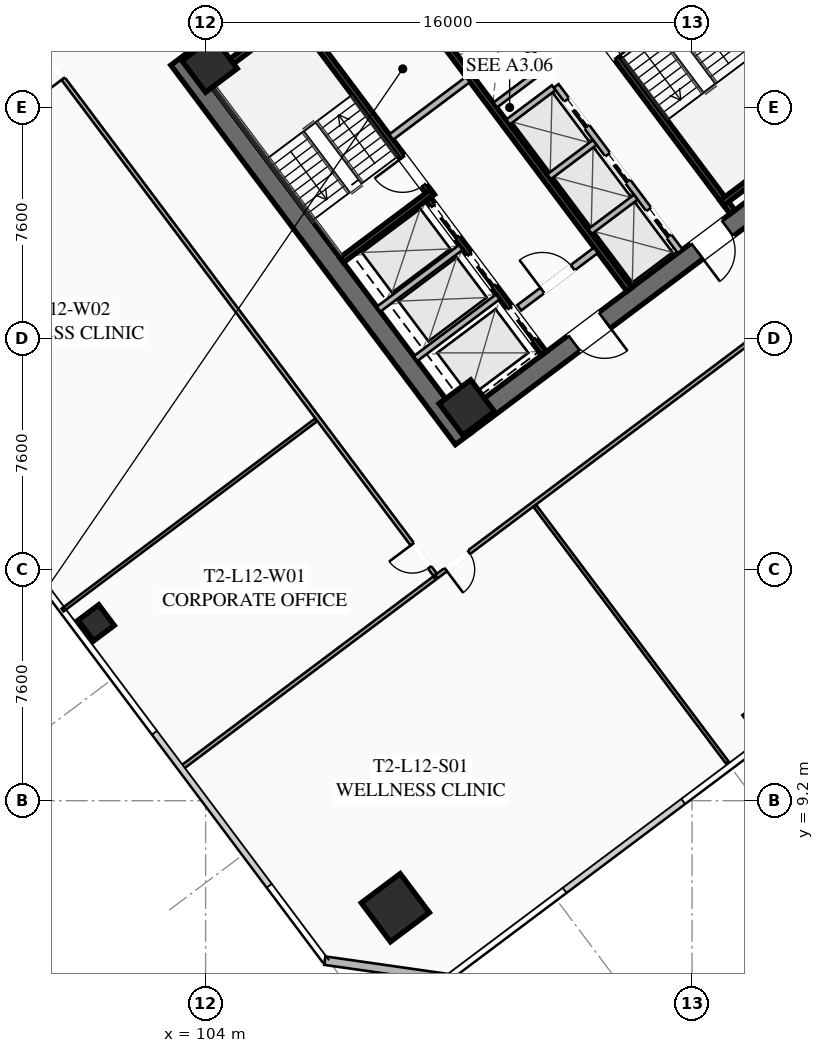
"""IFC4 building model, lengths in metres.
Left out: names, types, materials, properties, quantities, classifications, styles, units other than length and angle.
Written with IfcOpenShell. Run it as: python <this file> out.ifc"""

import sys

from ifc_helpers import new_model, si_unit, direction, frame, frame_2d, origin, origin_2d, place, context, subcontext, project, spatial, rectangle, hollow_rectangle, extrude, element, fill, save


model = new_model("IFC4")
c1 = context("Model", 3, precision=1e-05, world=origin(), true_north=direction((0.0, 1.0)))
c2 = subcontext(c1, "Body", "Model", "MODEL_VIEW")
j1 = project(units=[si_unit("LENGTHUNIT", "METRE"), si_unit("PLANEANGLEUNIT", "RADIAN")], contexts=[c1])
p1 = place(None, origin())
s1 = spatial("IfcSite", under=j1, at=p1, CompositionType="ELEMENT")
p2 = place(p1, origin())
s2 = spatial("IfcBuilding", under=s1, at=p2, CompositionType="ELEMENT")
p3 = place(p2, frame((0.0, 0.0, 49.45)))
s3 = spatial("IfcBuildingStorey", under=s2, at=p3, CompositionType="ELEMENT", Elevation=49.45)
for number, where, z_axis, x_axis in (
    (1, (112.476, 21.107, 0.0), (0.0, 0.0, 1.0), (-0.6, 0.8, 0.0)),
    (2, (115.524, 42.893, 0.0), (0.0, 0.0, 1.0), (0.6, -0.8, 0.0)),
):
    element("IfcWall", number, at=place(p3, frame(where, z_axis=z_axis, x_axis=x_axis)), inside=s3, PredefinedType="SHEAR", context=c2, shape_type="SweptSolid", body=[
        extrude(rectangle(XDim=15.6, YDim=0.65, at=frame_2d((7.8, 0.0))), origin(), (0.0, 0.0, 1.0), 3.55),
    ])
p4 = place(p3, frame((124.429, 30.478, 0.0), z_axis=(0.0, 0.0, 1.0), x_axis=(-0.799998028465, -0.600002628705, 0.0)))
e3 = element("IfcWall", 3, at=p4, inside=s3, PredefinedType="SHEAR", context=c2, shape_type="SweptSolid", body=[
    extrude(rectangle(XDim=14.86, YDim=0.65, at=frame_2d((7.43, 0.0))), origin(), (0.0, 0.0, 1.0), 3.55),
])
p5 = place(p4, frame((9.13, 0.0, 0.0)))
e4 = element("IfcOpeningElement", 4, at=p5, cuts=e3, PredefinedType="OPENING", context=c2, shape_type="SweptSolid", body=[
    extrude(rectangle(XDim=1.25, YDim=2.25, at=frame_2d((0.625, 1.125))), frame((0.0, 0.335, 0.0), z_axis=(0.0, -1.0, 0.0), x_axis=(1.0, 0.0, 0.0)), (0.0, 0.0, 1.0), 0.67),
])
p6 = place(p4, frame((4.08, 0.0, 0.0)))
e5 = element("IfcOpeningElement", 5, at=p6, cuts=e3, PredefinedType="OPENING", context=c2, shape_type="SweptSolid", body=[
    extrude(rectangle(XDim=1.25, YDim=2.25, at=frame_2d((0.625, 1.125))), frame((0.0, 0.335, 0.0), z_axis=(0.0, -1.0, 0.0), x_axis=(1.0, 0.0, 0.0)), (0.0, 0.0, 1.0), 0.67),
])
p7 = place(p3, frame((103.571, 33.522, 0.0), z_axis=(0.0, 0.0, 1.0), x_axis=(0.799998028465, 0.600002628705, 0.0)))
e6 = element("IfcWall", 6, at=p7, inside=s3, PredefinedType="SHEAR", context=c2, shape_type="SweptSolid", body=[
    extrude(rectangle(XDim=14.86, YDim=0.65, at=frame_2d((7.43, 0.0))), origin(), (0.0, 0.0, 1.0), 3.55),
])
p8 = place(p7, frame((4.48, 0.0, 0.0)))
e7 = element("IfcOpeningElement", 7, at=p8, cuts=e6, PredefinedType="OPENING", context=c2, shape_type="SweptSolid", body=[
    extrude(rectangle(XDim=1.25, YDim=2.25, at=frame_2d((0.625, 1.125))), frame((0.0, 0.335, 0.0), z_axis=(0.0, -1.0, 0.0), x_axis=(1.0, 0.0, 0.0)), (0.0, 0.0, 1.0), 0.67),
])
p9 = place(p7, frame((9.53, 0.0, 0.0)))
e8 = element("IfcOpeningElement", 8, at=p9, cuts=e6, PredefinedType="OPENING", context=c2, shape_type="SweptSolid", body=[
    extrude(rectangle(XDim=1.25, YDim=2.25, at=frame_2d((0.625, 1.125))), frame((0.0, 0.335, 0.0), z_axis=(0.0, -1.0, 0.0), x_axis=(1.0, 0.0, 0.0)), (0.0, 0.0, 1.0), 0.67),
])
for number, where, z_axis, x_axis in (
    (9, (112.59, 22.13, 0.0), (0.0, 0.0, 1.0), (0.8, 0.6, 0.0)),
    (10, (104.13, 33.41, 0.0), (0.0, 0.0, 1.0), (0.8, 0.6, 0.0)),
):
    element("IfcColumn", number, at=place(p3, frame(where, z_axis=z_axis, x_axis=x_axis)), inside=s3, PredefinedType="COLUMN", context=c2, shape_type="SweptSolid", body=[
        extrude(hollow_rectangle(XDim=1.3, YDim=1.3, WallThickness=0.05, at=origin_2d()), origin(), (0.0, 0.0, 1.0), 3.35),
    ])
p10 = place(p3, frame((110.24, 5.68, 0.0), z_axis=(0.0, 0.0, 1.0), x_axis=(0.799999996291, 0.600000004945, 0.0)))
e11 = element("IfcColumn", 11, at=p10, inside=s3, PredefinedType="COLUMN", context=c2, shape_type="SweptSolid", body=[
    extrude(hollow_rectangle(XDim=1.6, YDim=1.6, WallThickness=0.06, at=origin_2d()), origin(), (0.0, 0.0, 1.0), 3.35),
])
for number, where, z_axis, x_axis in (
    (12, (122.31, 11.92, 0.0), (0.0, 0.0, 1.0), (0.8, 0.6, 0.0)),
    (13, (100.4, 15.05, 0.0), (0.0, 0.0, 1.0), (0.8, 0.6, 0.0)),
):
    element("IfcColumn", number, at=place(p3, frame(where, z_axis=z_axis, x_axis=x_axis)), inside=s3, PredefinedType="COLUMN", context=c2, shape_type="SweptSolid", body=[
        extrude(hollow_rectangle(XDim=0.85, YDim=0.85, WallThickness=0.035, at=origin_2d()), origin(), (0.0, 0.0, 1.0), 3.35),
    ])
p11 = place(p3, frame((111.98, 3.36, 0.0), z_axis=(0.0, 0.0, 1.0), x_axis=(-0.989955445613, 0.14137968631, 0.0)))
e14 = element("IfcWall", 14, at=p11, inside=s3, PredefinedType="SOLIDWALL", context=c2, shape_type="SweptSolid", body=[
    extrude(rectangle(XDim=4.101, YDim=0.28, at=frame_2d((2.051, 0.0))), origin(), (0.0, 0.0, 1.0), 3.35),
])
p12 = place(p3, frame((111.44, 29.08, 0.0), z_axis=(0.0, 0.0, 1.0), x_axis=(-0.600009827119, 0.799992629566, 0.0)))
e15 = element("IfcWall", 15, at=p12, inside=s3, PredefinedType="SHEAR", context=c2, shape_type="SweptSolid", body=[
    extrude(rectangle(XDim=7.95, YDim=0.2, at=frame_2d((3.975, 0.0))), origin(), (0.0, 0.0, 1.0), 3.35),
])
p13 = place(p12, frame((0.45, 0.0, 0.0)))
e16 = element("IfcOpeningElement", 16, at=p13, cuts=e15, PredefinedType="OPENING", context=c2, shape_type="SweptSolid", body=[
    extrude(rectangle(XDim=1.15, YDim=2.2, at=frame_2d((0.575, 1.1))), frame((0.0, 0.11, 0.0), z_axis=(0.0, -1.0, 0.0), x_axis=(1.0, 0.0, 0.0)), (0.0, 0.0, 1.0), 0.22),
])
for number, where, z_axis, x_axis in (
    (17, (108.476, 26.982, 0.0), (0.0, 0.0, 1.0), (0.8, 0.6, 0.0)),
    (18, (104.036, 32.902, 0.0), (0.0, 0.0, 1.0), (0.8, 0.6, 0.0)),
):
    element("IfcWall", number, at=place(p3, frame(where, z_axis=z_axis, x_axis=x_axis)), inside=s3, PredefinedType="SHEAR", context=c2, shape_type="SweptSolid", body=[
        extrude(rectangle(XDim=3.73, YDim=0.2, at=frame_2d((1.865, 0.0))), origin(), (0.0, 0.0, 1.0), 3.35),
    ])
p14 = place(p3, frame((116.56, 34.92, 0.0), z_axis=(0.0, 0.0, 1.0), x_axis=(0.600009827119, -0.799992629566, 0.0)))
e19 = element("IfcWall", 19, at=p14, inside=s3, PredefinedType="SHEAR", context=c2, shape_type="SweptSolid", body=[
    extrude(rectangle(XDim=7.95, YDim=0.2, at=frame_2d((3.975, 0.0))), origin(), (0.0, 0.0, 1.0), 3.35),
])
p15 = place(p14, frame((0.45, 0.0, 0.0)))
e20 = element("IfcOpeningElement", 20, at=p15, cuts=e19, PredefinedType="OPENING", context=c2, shape_type="SweptSolid", body=[
    extrude(rectangle(XDim=1.15, YDim=2.2, at=frame_2d((0.575, 1.1))), frame((0.0, 0.11, 0.0), z_axis=(0.0, -1.0, 0.0), x_axis=(1.0, 0.0, 0.0)), (0.0, 0.0, 1.0), 0.22),
])
p16 = place(p3, frame((120.98, 28.86, 0.0), z_axis=(0.0, 0.0, 1.0), x_axis=(0.800039270442, 0.59994763584, 0.0)))
e21 = element("IfcWall", 21, at=p16, inside=s3, PredefinedType="SHEAR", context=c2, shape_type="SweptSolid", body=[
    extrude(rectangle(XDim=3.73, YDim=0.2, at=frame_2d((1.865, 0.0))), origin(), (0.0, 0.0, 1.0), 3.35),
])
p17 = place(p3, frame((117.938, 26.016, 0.0), z_axis=(0.0, 0.0, 1.0), x_axis=(-0.600005463273, 0.799995902516, 0.0)))
e22 = element("IfcWall", 22, at=p17, inside=s3, PredefinedType="SHEAR", context=c2, shape_type="SweptSolid", body=[
    extrude(rectangle(XDim=14.3, YDim=0.2, at=frame_2d((7.15, 0.0))), origin(), (0.0, 0.0, 1.0), 3.35),
])
p18 = place(p3, frame((110.104, 31.028, 0.0), z_axis=(0.0, 0.0, 1.0), x_axis=(0.800018601094, 0.59997519774, 0.0)))
e23 = element("IfcWall", 23, at=p18, inside=s3, PredefinedType="SOLIDWALL", context=c2, shape_type="SweptSolid", body=[
    extrude(rectangle(XDim=3.15, YDim=0.22, at=frame_2d((1.575, 0.0))), origin(), (0.0, 0.0, 1.0), 2.703),
])
p19 = place(p3, frame((114.316, 25.412, 0.0), z_axis=(0.0, 0.0, 1.0), x_axis=(0.800018601094, 0.59997519774, 0.0)))
e24 = element("IfcWall", 24, at=p19, inside=s3, PredefinedType="SOLIDWALL", context=c2, shape_type="SweptSolid", body=[
    extrude(rectangle(XDim=3.15, YDim=0.22, at=frame_2d((1.575, 0.0))), origin(), (0.0, 0.0, 1.0), 2.703),
])
p20 = place(p19, frame((0.95, 0.0, 0.0)))
e25 = element("IfcOpeningElement", 25, at=p20, cuts=e24, PredefinedType="OPENING", context=c2, shape_type="SweptSolid", body=[
    extrude(rectangle(XDim=1.25, YDim=2.25, at=frame_2d((0.625, 1.125))), frame((0.0, 0.12, 0.0), z_axis=(0.0, -1.0, 0.0), x_axis=(1.0, 0.0, 0.0)), (0.0, 0.0, 1.0), 0.24),
])
p21 = place(p3, frame((115.13, 23.91, 0.0), z_axis=(0.0, 0.0, 1.0), x_axis=(-0.599975393228, 0.800018454488, 0.0)))
e26 = element("IfcWall", 26, at=p21, inside=s3, PredefinedType="SHEAR", context=c2, shape_type="SweptSolid", body=[
    extrude(rectangle(XDim=6.35, YDim=0.2, at=frame_2d((3.175, 0.0))), origin(), (0.0, 0.0, 1.0), 3.35),
])
p22 = place(p21, frame((4.775, 0.0, 0.0)))
e27 = element("IfcOpeningElement", 27, at=p22, cuts=e26, PredefinedType="OPENING", context=c2, shape_type="SweptSolid", body=[
    extrude(rectangle(XDim=1.3, YDim=2.25, at=frame_2d((0.65, 1.125))), frame((0.0, 0.11, 0.0), z_axis=(0.0, -1.0, 0.0), x_axis=(1.0, 0.0, 0.0)), (0.0, 0.0, 1.0), 0.22),
])
p23 = place(p21, frame((2.775, 0.0, 0.0)))
e28 = element("IfcOpeningElement", 28, at=p23, cuts=e26, PredefinedType="OPENING", context=c2, shape_type="SweptSolid", body=[
    extrude(rectangle(XDim=1.3, YDim=2.25, at=frame_2d((0.65, 1.125))), frame((0.0, 0.11, 0.0), z_axis=(0.0, -1.0, 0.0), x_axis=(1.0, 0.0, 0.0)), (0.0, 0.0, 1.0), 0.22),
])
p24 = place(p21, frame((0.575, 0.0, 0.0)))
e29 = element("IfcOpeningElement", 29, at=p24, cuts=e26, PredefinedType="OPENING", context=c2, shape_type="SweptSolid", body=[
    extrude(rectangle(XDim=1.3, YDim=2.25, at=frame_2d((0.65, 1.125))), frame((0.0, 0.11, 0.0), z_axis=(0.0, -1.0, 0.0), x_axis=(1.0, 0.0, 0.0)), (0.0, 0.0, 1.0), 0.22),
])
for number, where, z_axis, x_axis in (
    (30, (110.906, 23.742, 0.0), (0.0, 0.0, 1.0), (0.8, 0.6, 0.0)),
    (31, (109.688, 25.366, 0.0), (0.0, 0.0, 1.0), (0.8, 0.6, 0.0)),
):
    element("IfcWall", number, at=place(p3, frame(where, z_axis=z_axis, x_axis=x_axis)), inside=s3, PredefinedType="SOLIDWALL", context=c2, shape_type="SweptSolid", body=[
        extrude(rectangle(XDim=3.38, YDim=0.2, at=frame_2d((1.69, 0.0))), origin(), (0.0, 0.0, 1.0), 3.35),
    ])
p25 = place(p3, frame((119.61, 27.27, 0.0), z_axis=(0.0, 0.0, 1.0), x_axis=(-0.600011488909, 0.79999138319, 0.0)))
e32 = element("IfcWall", 32, at=p25, inside=s3, PredefinedType="SOLIDWALL", context=c2, shape_type="SweptSolid", body=[
    extrude(rectangle(XDim=6.8, YDim=0.2, at=frame_2d((3.4, 0.0))), origin(), (0.0, 0.0, 1.0), 3.35),
])
p26 = place(p25, frame((0.625, 0.0, 0.0)))
e33 = element("IfcOpeningElement", 33, at=p26, cuts=e32, PredefinedType="OPENING", context=c2, shape_type="SweptSolid", body=[
    extrude(rectangle(XDim=1.1, YDim=2.2, at=frame_2d((0.55, 1.1))), frame((0.0, 0.11, 0.0), z_axis=(0.0, -1.0, 0.0), x_axis=(1.0, 0.0, 0.0)), (0.0, 0.0, 1.0), 0.22),
])
p27 = place(p25, frame((2.875, 0.0, 0.0)))
e34 = element("IfcOpeningElement", 34, at=p27, cuts=e32, PredefinedType="OPENING", context=c2, shape_type="SweptSolid", body=[
    extrude(rectangle(XDim=1.1, YDim=2.2, at=frame_2d((0.55, 1.1))), frame((0.0, 0.11, 0.0), z_axis=(0.0, -1.0, 0.0), x_axis=(1.0, 0.0, 0.0)), (0.0, 0.0, 1.0), 0.22),
])
p28 = place(p25, frame((5.125, 0.0, 0.0)))
e35 = element("IfcOpeningElement", 35, at=p28, cuts=e32, PredefinedType="OPENING", context=c2, shape_type="SweptSolid", body=[
    extrude(rectangle(XDim=1.1, YDim=2.2, at=frame_2d((0.55, 1.1))), frame((0.0, 0.11, 0.0), z_axis=(0.0, -1.0, 0.0), x_axis=(1.0, 0.0, 0.0)), (0.0, 0.0, 1.0), 0.22),
])
p29 = place(p3, frame((116.646, 27.922, 0.0), z_axis=(0.0, 0.0, 1.0), x_axis=(0.8, 0.6, 0.0)))
e36 = element("IfcWall", 36, at=p29, inside=s3, PredefinedType="SOLIDWALL", context=c2, shape_type="SweptSolid", body=[
    extrude(rectangle(XDim=1.88, YDim=0.2, at=frame_2d((0.94, 0.0))), origin(), (0.0, 0.0, 1.0), 3.35),
])
p30 = place(p3, frame((115.296, 29.722, 0.0), z_axis=(0.0, 0.0, 1.0), x_axis=(0.799984418148, 0.600020775241, 0.0)))
e37 = element("IfcWall", 37, at=p30, inside=s3, PredefinedType="SOLIDWALL", context=c2, shape_type="SweptSolid", body=[
    extrude(rectangle(XDim=1.88, YDim=0.2, at=frame_2d((0.94, 0.0))), origin(), (0.0, 0.0, 1.0), 3.35),
])
p31 = place(p3, frame((113.946, 31.522, 0.0), z_axis=(0.0, 0.0, 1.0), x_axis=(0.8, 0.6, 0.0)))
e38 = element("IfcWall", 38, at=p31, inside=s3, PredefinedType="SOLIDWALL", context=c2, shape_type="SweptSolid", body=[
    extrude(rectangle(XDim=1.88, YDim=0.2, at=frame_2d((0.94, 0.0))), origin(), (0.0, 0.0, 1.0), 3.35),
])
p32 = place(p3, frame((115.11, 33.27, 0.0), z_axis=(0.0, 0.0, 1.0), x_axis=(-0.600011488909, 0.79999138319, 0.0)))
e39 = element("IfcWall", 39, at=p32, inside=s3, PredefinedType="SOLIDWALL", context=c2, shape_type="SweptSolid", body=[
    extrude(rectangle(XDim=6.8, YDim=0.2, at=frame_2d((3.4, 0.0))), origin(), (0.0, 0.0, 1.0), 3.35),
])
p33 = place(p3, frame((113.526, 32.082, 0.0), z_axis=(0.0, 0.0, 1.0), x_axis=(0.800046745961, 0.599937666993, 0.0)))
e40 = element("IfcWall", 40, at=p33, inside=s3, PredefinedType="SOLIDWALL", context=c2, shape_type="SweptSolid", body=[
    extrude(rectangle(XDim=1.88, YDim=0.2, at=frame_2d((0.94, 0.0))), origin(), (0.0, 0.0, 1.0), 3.35),
])
p34 = place(p3, frame((112.176, 33.882, 0.0), z_axis=(0.0, 0.0, 1.0), x_axis=(0.8, 0.6, 0.0)))
e41 = element("IfcWall", 41, at=p34, inside=s3, PredefinedType="SOLIDWALL", context=c2, shape_type="SweptSolid", body=[
    extrude(rectangle(XDim=1.88, YDim=0.2, at=frame_2d((0.94, 0.0))), origin(), (0.0, 0.0, 1.0), 3.35),
])
p35 = place(p3, frame((135.46, 34.47, 0.0), z_axis=(0.0, 0.0, 1.0), x_axis=(-0.800000982127, -0.599998690494, 0.0)))
e42 = element("IfcWall", 42, at=p35, inside=s3, PredefinedType="PARTITIONING", context=c2, shape_type="SweptSolid", body=[
    extrude(rectangle(XDim=29.83, YDim=0.135, at=frame_2d((14.915, 0.0))), origin(), (0.0, 0.0, 1.0), 2.703),
])
p36 = place(p35, frame((28.5, 0.0, 0.0)))
e43 = element("IfcOpeningElement", 43, at=p36, cuts=e42, PredefinedType="OPENING", context=c2, shape_type="SweptSolid", body=[
    extrude(rectangle(XDim=0.95, YDim=2.05, at=frame_2d((0.475, 1.025))), frame((0.0, 0.077, 0.0), z_axis=(0.0, -1.0, 0.0), x_axis=(1.0, 0.0, 0.0)), (0.0, 0.0, 1.0), 0.155),
])
p37 = place(p35, frame((0.38, 0.0, 0.0)))
e44 = element("IfcOpeningElement", 44, at=p37, cuts=e42, PredefinedType="OPENING", context=c2, shape_type="SweptSolid", body=[
    extrude(rectangle(XDim=0.95, YDim=2.05, at=frame_2d((0.475, 1.025))), frame((0.0, 0.077, 0.0), z_axis=(0.0, -1.0, 0.0), x_axis=(1.0, 0.0, 0.0)), (0.0, 0.0, 1.0), 0.155),
])
p38 = place(p3, frame((121.158, 10.456, 0.0), z_axis=(0.0, 0.0, 1.0), x_axis=(-0.600007405188, 0.799994446056, 0.0)))
e45 = element("IfcWall", 45, at=p38, inside=s3, PredefinedType="PARTITIONING", context=c2, shape_type="SweptSolid", body=[
    extrude(rectangle(XDim=10.55, YDim=0.11, at=frame_2d((5.275, 0.0))), origin(), (0.0, 0.0, 1.0), 2.703),
])
p39 = place(p3, frame((111.548, 16.636, 0.0), z_axis=(0.0, 0.0, 1.0), x_axis=(-0.600003610192, 0.799997292343, 0.0)))
e46 = element("IfcWall", 46, at=p39, inside=s3, PredefinedType="PARTITIONING", context=c2, shape_type="SweptSolid", body=[
    extrude(rectangle(XDim=21.64, YDim=0.135, at=frame_2d((10.82, 0.0))), origin(), (0.0, 0.0, 1.0), 2.703),
])
p40 = place(p39, frame((0.3, 0.0, 0.0)))
e47 = element("IfcOpeningElement", 47, at=p40, cuts=e46, PredefinedType="OPENING", context=c2, shape_type="SweptSolid", body=[
    extrude(rectangle(XDim=0.95, YDim=2.05, at=frame_2d((0.475, 1.025))), frame((0.0, 0.077, 0.0), z_axis=(0.0, -1.0, 0.0), x_axis=(1.0, 0.0, 0.0)), (0.0, 0.0, 1.0), 0.155),
])
p41 = place(p39, frame((20.39, 0.0, 0.0)))
e48 = element("IfcOpeningElement", 48, at=p41, cuts=e46, PredefinedType="OPENING", context=c2, shape_type="SweptSolid", body=[
    extrude(rectangle(XDim=0.95, YDim=2.05, at=frame_2d((0.475, 1.025))), frame((0.0, 0.077, 0.0), z_axis=(0.0, -1.0, 0.0), x_axis=(1.0, 0.0, 0.0)), (0.0, 0.0, 1.0), 0.155),
])
p42 = place(p3, frame((103.196, 10.272, 0.0), z_axis=(0.0, 0.0, 1.0), x_axis=(0.8, 0.6, 0.0)))
e49 = element("IfcWall", 49, at=p42, inside=s3, PredefinedType="PARTITIONING", context=c2, shape_type="SweptSolid", body=[
    extrude(rectangle(XDim=10.42, YDim=0.135, at=frame_2d((5.21, 0.0))), origin(), (0.0, 0.0, 1.0), 2.703),
])
p43 = place(p3, frame((99.296, 15.472, 0.0), z_axis=(0.0, 0.0, 1.0), x_axis=(0.799997188462, 0.600003748699, 0.0)))
e50 = element("IfcWall", 50, at=p43, inside=s3, PredefinedType="PARTITIONING", context=c2, shape_type="SweptSolid", body=[
    extrude(rectangle(XDim=10.42, YDim=0.11, at=frame_2d((5.21, 0.0))), origin(), (0.0, 0.0, 1.0), 2.703),
])
p44 = place(p5, origin())
e51 = element("IfcDoor", 51, at=p44, inside=s3, OperationType="SINGLE_SWING_LEFT", PredefinedType="DOOR", context=c2, shape_type="SweptSolid", body=[
    extrude(rectangle(XDim=1.25, YDim=2.25, at=frame_2d((0.625, 1.125))), frame((0.0, 0.025, 0.0), z_axis=(0.0, -1.0, 0.0), x_axis=(1.0, 0.0, 0.0)), (0.0, 0.0, 1.0), 0.05),
])
fill(e4, e51)
p45 = place(p6, origin())
e52 = element("IfcDoor", 52, at=p45, inside=s3, OperationType="SINGLE_SWING_RIGHT", PredefinedType="DOOR", context=c2, shape_type="SweptSolid", body=[
    extrude(rectangle(XDim=1.25, YDim=2.25, at=frame_2d((0.625, 1.125))), frame((0.0, 0.025, 0.0), z_axis=(0.0, -1.0, 0.0), x_axis=(1.0, 0.0, 0.0)), (0.0, 0.0, 1.0), 0.05),
])
fill(e5, e52)
p46 = place(p13, origin())
e53 = element("IfcDoor", 53, at=p46, inside=s3, OperationType="SINGLE_SWING_RIGHT", PredefinedType="DOOR", context=c2, shape_type="SweptSolid", body=[
    extrude(rectangle(XDim=1.15, YDim=2.2, at=frame_2d((0.575, 1.1))), frame((0.0, 0.025, 0.0), z_axis=(0.0, -1.0, 0.0), x_axis=(1.0, 0.0, 0.0)), (0.0, 0.0, 1.0), 0.05),
])
fill(e16, e53)
p47 = place(p15, origin())
e54 = element("IfcDoor", 54, at=p47, inside=s3, OperationType="SINGLE_SWING_RIGHT", PredefinedType="DOOR", context=c2, shape_type="SweptSolid", body=[
    extrude(rectangle(XDim=1.15, YDim=2.2, at=frame_2d((0.575, 1.1))), frame((0.0, 0.025, 0.0), z_axis=(0.0, -1.0, 0.0), x_axis=(1.0, 0.0, 0.0)), (0.0, 0.0, 1.0), 0.05),
])
fill(e20, e54)
p48 = place(p20, origin())
e55 = element("IfcDoor", 55, at=p48, inside=s3, OperationType="SINGLE_SWING_LEFT", PredefinedType="DOOR", context=c2, shape_type="SweptSolid", body=[
    extrude(rectangle(XDim=1.25, YDim=2.25, at=frame_2d((0.625, 1.125))), frame((0.0, 0.025, 0.0), z_axis=(0.0, -1.0, 0.0), x_axis=(1.0, 0.0, 0.0)), (0.0, 0.0, 1.0), 0.05),
])
fill(e25, e55)
p49 = place(p36, origin())
e56 = element("IfcDoor", 56, at=p49, inside=s3, OperationType="SINGLE_SWING_RIGHT", PredefinedType="DOOR", context=c2, shape_type="SweptSolid", body=[
    extrude(rectangle(XDim=0.95, YDim=2.05, at=frame_2d((0.475, 1.025))), frame((0.0, 0.025, 0.0), z_axis=(0.0, -1.0, 0.0), x_axis=(1.0, 0.0, 0.0)), (0.0, 0.0, 1.0), 0.05),
])
fill(e43, e56)
p50 = place(p40, origin())
e57 = element("IfcDoor", 57, at=p50, inside=s3, OperationType="SINGLE_SWING_RIGHT", PredefinedType="DOOR", context=c2, shape_type="SweptSolid", body=[
    extrude(rectangle(XDim=0.95, YDim=2.05, at=frame_2d((0.475, 1.025))), frame((0.0, 0.025, 0.0), z_axis=(0.0, -1.0, 0.0), x_axis=(1.0, 0.0, 0.0)), (0.0, 0.0, 1.0), 0.05),
])
fill(e47, e57)
p51 = place(p41, origin())
e58 = element("IfcDoor", 58, at=p51, inside=s3, OperationType="SINGLE_SWING_LEFT", PredefinedType="DOOR", context=c2, shape_type="SweptSolid", body=[
    extrude(rectangle(XDim=0.95, YDim=2.05, at=frame_2d((0.475, 1.025))), frame((0.0, 0.025, 0.0), z_axis=(0.0, -1.0, 0.0), x_axis=(1.0, 0.0, 0.0)), (0.0, 0.0, 1.0), 0.05),
])
fill(e48, e58)
p52 = place(p22, origin())
e59 = element("IfcDoor", 59, at=p52, inside=s3, OperationType="SLIDING_TO_LEFT", PredefinedType="DOOR", context=c2, shape_type="SweptSolid", body=[
    extrude(rectangle(XDim=1.3, YDim=2.25, at=frame_2d((0.65, 1.125))), frame((0.0, 0.025, 0.0), z_axis=(0.0, -1.0, 0.0), x_axis=(1.0, 0.0, 0.0)), (0.0, 0.0, 1.0), 0.05),
])
fill(e27, e59)
p53 = place(p23, origin())
e60 = element("IfcDoor", 60, at=p53, inside=s3, OperationType="SLIDING_TO_LEFT", PredefinedType="DOOR", context=c2, shape_type="SweptSolid", body=[
    extrude(rectangle(XDim=1.3, YDim=2.25, at=frame_2d((0.65, 1.125))), frame((0.0, 0.025, 0.0), z_axis=(0.0, -1.0, 0.0), x_axis=(1.0, 0.0, 0.0)), (0.0, 0.0, 1.0), 0.05),
])
fill(e28, e60)
p54 = place(p24, origin())
e61 = element("IfcDoor", 61, at=p54, inside=s3, OperationType="SLIDING_TO_LEFT", PredefinedType="DOOR", context=c2, shape_type="SweptSolid", body=[
    extrude(rectangle(XDim=1.3, YDim=2.25, at=frame_2d((0.65, 1.125))), frame((0.0, 0.025, 0.0), z_axis=(0.0, -1.0, 0.0), x_axis=(1.0, 0.0, 0.0)), (0.0, 0.0, 1.0), 0.05),
])
fill(e29, e61)
p55 = place(p26, origin())
e62 = element("IfcDoor", 62, at=p55, inside=s3, OperationType="SLIDING_TO_LEFT", PredefinedType="DOOR", context=c2, shape_type="SweptSolid", body=[
    extrude(rectangle(XDim=1.1, YDim=2.2, at=frame_2d((0.55, 1.1))), frame((0.0, 0.025, 0.0), z_axis=(0.0, -1.0, 0.0), x_axis=(1.0, 0.0, 0.0)), (0.0, 0.0, 1.0), 0.05),
])
fill(e33, e62)
p56 = place(p27, origin())
e63 = element("IfcDoor", 63, at=p56, inside=s3, OperationType="SLIDING_TO_LEFT", PredefinedType="DOOR", context=c2, shape_type="SweptSolid", body=[
    extrude(rectangle(XDim=1.1, YDim=2.2, at=frame_2d((0.55, 1.1))), frame((0.0, 0.025, 0.0), z_axis=(0.0, -1.0, 0.0), x_axis=(1.0, 0.0, 0.0)), (0.0, 0.0, 1.0), 0.05),
])
fill(e34, e63)
p57 = place(p28, origin())
e64 = element("IfcDoor", 64, at=p57, inside=s3, OperationType="SLIDING_TO_LEFT", PredefinedType="DOOR", context=c2, shape_type="SweptSolid", body=[
    extrude(rectangle(XDim=1.1, YDim=2.2, at=frame_2d((0.55, 1.1))), frame((0.0, 0.025, 0.0), z_axis=(0.0, -1.0, 0.0), x_axis=(1.0, 0.0, 0.0)), (0.0, 0.0, 1.0), 0.05),
])
fill(e35, e64)
save(model, sys.argv[1])
